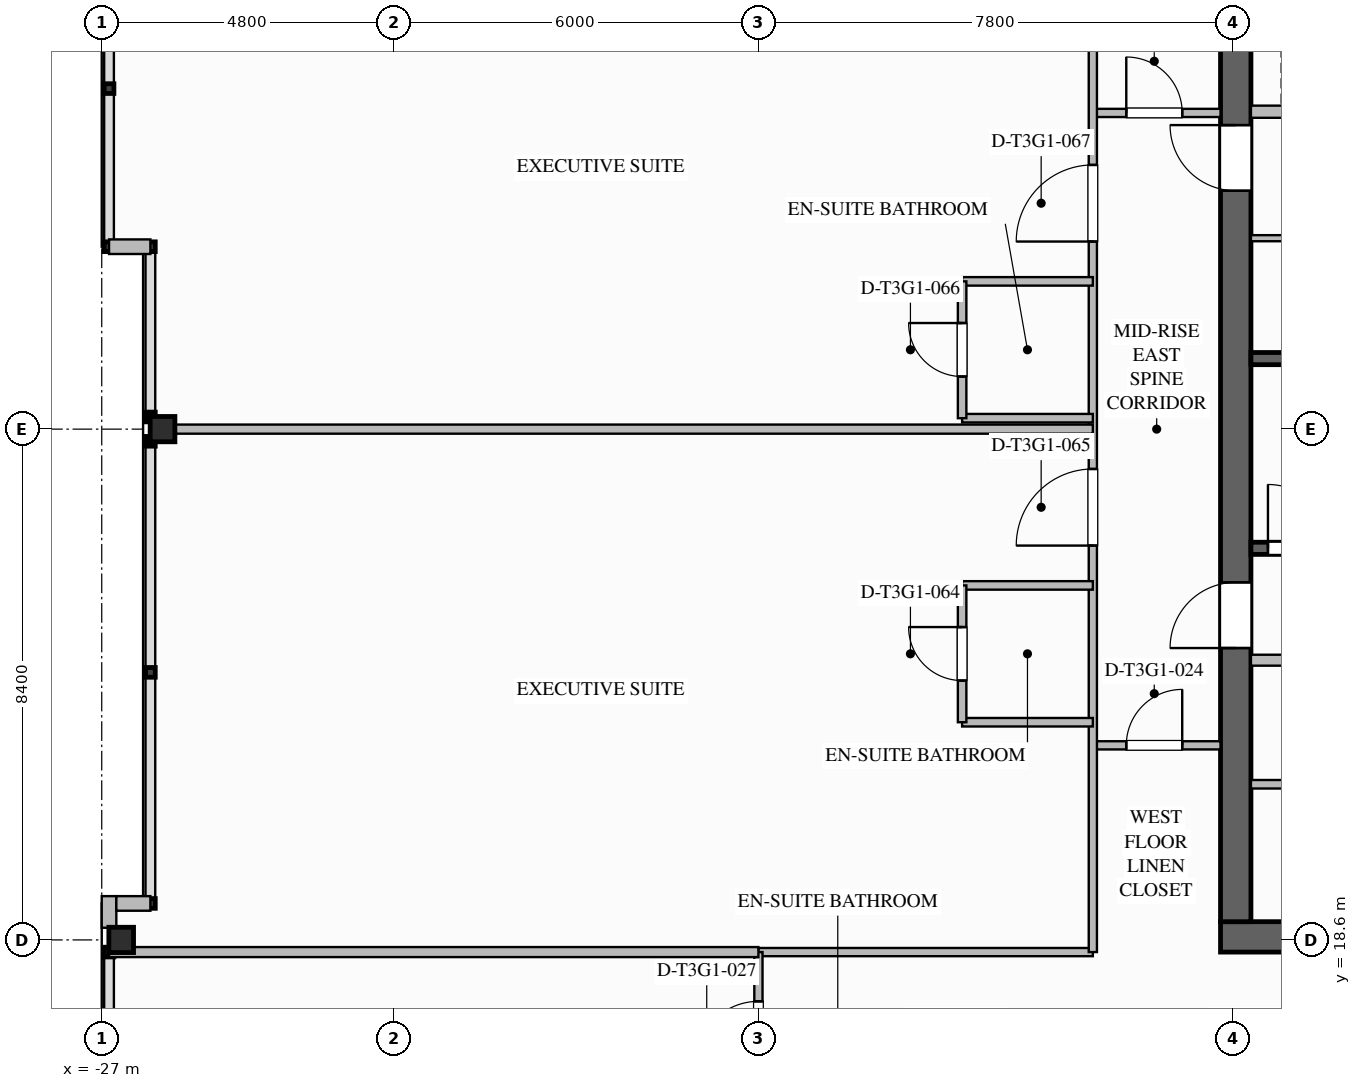
"""IFC4 building model, lengths in metres.
Left out: names, types, materials, properties, quantities, classifications, styles, units other than length and angle.
Written with IfcOpenShell. Run it as: python <this file> out.ifc"""

import sys

from ifc_helpers import new_model, si_unit, direction, frame, frame_2d, origin, origin_2d, place, context, subcontext, project, spatial, rectangle, i_section, extrude, element, fill, save


model = new_model("IFC4")
c1 = context("Model", 3, precision=1e-05, world=origin(), true_north=direction((0.0, 1.0)))
c2 = subcontext(c1, "Body", "Model", "MODEL_VIEW")
j1 = project(units=[si_unit("LENGTHUNIT", "METRE"), si_unit("PLANEANGLEUNIT", "RADIAN")], contexts=[c1])
p1 = place(None, origin())
s1 = spatial("IfcSite", under=j1, at=p1, CompositionType="ELEMENT")
p2 = place(p1, origin())
s2 = spatial("IfcBuilding", under=s1, at=p2, CompositionType="ELEMENT")
p3 = place(p2, frame((0.0, 0.0, 150.4)))
s3 = spatial("IfcBuildingStorey", under=s2, at=p3, CompositionType="ELEMENT", Elevation=150.4)
p4 = place(p3, frame((8.6, 18.65, 0.0), z_axis=(0.0, 0.0, 1.0), x_axis=(-1.0, 0.0, 0.0)))
e1 = element("IfcWall", 1, at=p4, inside=s3, PredefinedType="SHEAR", context=c2, shape_type="SweptSolid", body=[
    extrude(rectangle(XDim=17.2, YDim=0.5, at=frame_2d((8.6, 0.0))), origin(), (0.0, 0.0, 1.0), 3.55),
])
p5 = place(p3, frame((-8.35, 18.9, 0.0), z_axis=(0.0, 0.0, 1.0), x_axis=(0.0, 1.0, 0.0)))
e2 = element("IfcWall", 2, at=p5, inside=s3, PredefinedType="SHEAR", context=c2, shape_type="SweptSolid", body=[
    extrude(rectangle(XDim=16.2, YDim=0.5, at=frame_2d((8.1, 0.0))), origin(), (0.0, 0.0, 1.0), 3.55),
])
p6 = place(p5, frame((12.02, 0.0, 0.0)))
e3 = element("IfcOpeningElement", 3, at=p6, cuts=e2, PredefinedType="OPENING", context=c2, shape_type="SweptSolid", body=[
    extrude(rectangle(XDim=1.08, YDim=2.04, at=frame_2d((0.54, 1.02))), frame((0.0, 0.26, 0.0), z_axis=(0.0, -1.0, 0.0), x_axis=(1.0, 0.0, 0.0)), (0.0, 0.0, 1.0), 0.52),
])
p7 = place(p5, frame((4.5, 0.0, 0.0)))
e4 = element("IfcOpeningElement", 4, at=p7, cuts=e2, PredefinedType="OPENING", context=c2, shape_type="SweptSolid", body=[
    extrude(rectangle(XDim=1.08, YDim=2.04, at=frame_2d((0.54, 1.02))), frame((0.0, 0.26, 0.0), z_axis=(0.0, -1.0, 0.0), x_axis=(1.0, 0.0, 0.0)), (0.0, 0.0, 1.0), 0.52),
])
for number, where, z_axis, x_axis in (
    (5, (-26.68, 18.6, 0.0), (0.0, 0.0, 1.0), (1.0, 0.0, 0.0)),
    (6, (-26.0, 27.0, 0.0), (0.0, 0.0, 1.0), (1.0, 0.0, 0.0)),
):
    element("IfcColumn", number, at=place(p3, frame(where, z_axis=z_axis, x_axis=x_axis)), inside=s3, PredefinedType="COLUMN", context=c2, shape_type="SweptSolid", body=[
        extrude(i_section(OverallWidth=0.406, OverallDepth=0.416, WebThickness=0.03, FlangeThickness=0.048, FilletRadius=0.028, at=origin_2d()), origin(), (0.0, 0.0, 1.0), 3.547),
    ])
p8 = place(p3, frame((-26.88, 18.8, 0.0), z_axis=(0.0, 0.0, 1.0), x_axis=(0.0, 1.0, 0.0)))
e7 = element("IfcWall", 7, at=p8, inside=s3, PredefinedType="STANDARD", context=c2, shape_type="SweptSolid", body=[
    extrude(rectangle(XDim=0.52, YDim=0.24, at=frame_2d((0.26, 0.0))), origin(), (0.0, 0.0, 1.0), 3.29),
])
p9 = place(p3, frame((-26.76, 19.2, 0.0), z_axis=(0.0, 0.0, 1.0), x_axis=(1.0, 0.0, 0.0)))
e8 = element("IfcWall", 8, at=p9, inside=s3, PredefinedType="STANDARD", context=c2, shape_type="SweptSolid", body=[
    extrude(rectangle(XDim=0.56, YDim=0.24, at=frame_2d((0.28, 0.0))), origin(), (0.0, 0.0, 1.0), 3.29),
])
p10 = place(p3, frame((-26.2, 30.0, 0.0), z_axis=(0.0, 0.0, 1.0), x_axis=(-1.0, 0.0, 0.0)))
e9 = element("IfcWall", 9, at=p10, inside=s3, PredefinedType="STANDARD", context=c2, shape_type="SweptSolid", body=[
    extrude(rectangle(XDim=0.68, YDim=0.24, at=frame_2d((0.34, 0.0))), origin(), (0.0, 0.0, 1.0), 3.29),
])
p11 = place(p3, frame((-8.1, 25.04, 0.0), z_axis=(0.0, 0.0, 1.0), x_axis=(1.0, 0.0, 0.0)))
e10 = element("IfcWall", 10, at=p11, inside=s3, PredefinedType="SOLIDWALL", context=c2, shape_type="SweptSolid", body=[
    extrude(rectangle(XDim=8.1, YDim=0.2, at=frame_2d((4.05, 0.0))), origin(), (0.0, 0.0, 1.0), 3.29),
])
p12 = place(p11, frame((0.28, 0.0, 0.0)))
e11 = element("IfcOpeningElement", 11, at=p12, cuts=e10, PredefinedType="OPENING", context=c2, shape_type="SweptSolid", body=[
    extrude(rectangle(XDim=1.05, YDim=2.1, at=frame_2d((0.525, 1.05))), frame((0.0, 0.11, 0.0), z_axis=(0.0, -1.0, 0.0), x_axis=(1.0, 0.0, 0.0)), (0.0, 0.0, 1.0), 0.22),
])
p13 = place(p3, frame((-8.1, 28.16, 0.0), z_axis=(0.0, 0.0, 1.0), x_axis=(1.0, 0.0, 0.0)))
e12 = element("IfcWall", 12, at=p13, inside=s3, PredefinedType="SOLIDWALL", context=c2, shape_type="SweptSolid", body=[
    extrude(rectangle(XDim=8.1, YDim=0.2, at=frame_2d((4.05, 0.0))), origin(), (0.0, 0.0, 1.0), 3.29),
])
p14 = place(p3, frame((-8.1, 32.22, 0.0), z_axis=(0.0, 0.0, 1.0), x_axis=(1.0, 0.0, 0.0)))
e13 = element("IfcWall", 13, at=p14, inside=s3, PredefinedType="SOLIDWALL", context=c2, shape_type="SweptSolid", body=[
    extrude(rectangle(XDim=7.1, YDim=0.2, at=frame_2d((3.55, 0.0))), origin(), (0.0, 0.0, 1.0), 3.29),
])
p15 = place(p14, frame((0.95, 0.0, 0.0)))
e14 = element("IfcOpeningElement", 14, at=p15, cuts=e13, PredefinedType="OPENING", context=c2, shape_type="SweptSolid", body=[
    extrude(rectangle(XDim=1.1, YDim=2.2, at=frame_2d((0.55, 1.1))), frame((0.0, 0.11, 0.0), z_axis=(0.0, -1.0, 0.0), x_axis=(1.0, 0.0, 0.0)), (0.0, 0.0, 1.0), 0.22),
])
p16 = place(p14, frame((3.27, 0.0, 0.0)))
e15 = element("IfcOpeningElement", 15, at=p16, cuts=e13, PredefinedType="OPENING", context=c2, shape_type="SweptSolid", body=[
    extrude(rectangle(XDim=1.1, YDim=2.2, at=frame_2d((0.55, 1.1))), frame((0.0, 0.11, 0.0), z_axis=(0.0, -1.0, 0.0), x_axis=(1.0, 0.0, 0.0)), (0.0, 0.0, 1.0), 0.22),
])
p17 = place(p14, frame((5.59, 0.0, 0.0)))
e16 = element("IfcOpeningElement", 16, at=p17, cuts=e13, PredefinedType="OPENING", context=c2, shape_type="SweptSolid", body=[
    extrude(rectangle(XDim=1.1, YDim=2.2, at=frame_2d((0.55, 1.1))), frame((0.0, 0.11, 0.0), z_axis=(0.0, -1.0, 0.0), x_axis=(1.0, 0.0, 0.0)), (0.0, 0.0, 1.0), 0.22),
])
p18 = place(p3, frame((-8.1, 30.14, 0.0), z_axis=(0.0, 0.0, 1.0), x_axis=(1.0, 0.0, 0.0)))
e17 = element("IfcWall", 17, at=p18, inside=s3, PredefinedType="PARTITIONING", context=c2, shape_type="SweptSolid", body=[
    extrude(rectangle(XDim=7.1, YDim=0.1, at=frame_2d((3.55, 0.0))), origin(), (0.0, 0.0, 1.0), 3.29),
])
p19 = place(p18, frame((1.1, 0.0, 0.0)))
e18 = element("IfcOpeningElement", 18, at=p19, cuts=e17, PredefinedType="OPENING", context=c2, shape_type="SweptSolid", body=[
    extrude(rectangle(XDim=0.92, YDim=2.1, at=frame_2d((0.46, 1.05))), frame((0.0, 0.06, 0.0), z_axis=(0.0, -1.0, 0.0), x_axis=(1.0, 0.0, 0.0)), (0.0, 0.0, 1.0), 0.12),
])
p20 = place(p18, frame((4.6, 0.0, 0.0)))
e19 = element("IfcOpeningElement", 19, at=p20, cuts=e17, PredefinedType="OPENING", context=c2, shape_type="SweptSolid", body=[
    extrude(rectangle(XDim=0.92, YDim=2.1, at=frame_2d((0.46, 1.05))), frame((0.0, 0.06, 0.0), z_axis=(0.0, -1.0, 0.0), x_axis=(1.0, 0.0, 0.0)), (0.0, 0.0, 1.0), 0.12),
])
p21 = place(p3, frame((-8.1, 23.2, 0.0), z_axis=(0.0, 0.0, 1.0), x_axis=(1.0, 0.0, 0.0)))
e20 = element("IfcWall", 20, at=p21, inside=s3, PredefinedType="SOLIDWALL", context=c2, shape_type="SweptSolid", body=[
    extrude(rectangle(XDim=8.65, YDim=0.18, at=frame_2d((4.325, 0.0))), origin(), (0.0, 0.0, 1.0), 3.29),
])
p22 = place(p21, frame((1.4, 0.0, 0.0)))
e21 = element("IfcOpeningElement", 21, at=p22, cuts=e20, PredefinedType="OPENING", context=c2, shape_type="SweptSolid", body=[
    extrude(rectangle(XDim=1.0, YDim=2.1, at=frame_2d((0.5, 1.05))), frame((0.0, 0.1, 0.0), z_axis=(0.0, -1.0, 0.0), x_axis=(1.0, 0.0, 0.0)), (0.0, 0.0, 1.0), 0.2),
])
p23 = place(p21, frame((5.6, 0.0, 0.0)))
e22 = element("IfcOpeningElement", 22, at=p23, cuts=e20, PredefinedType="OPENING", context=c2, shape_type="SweptSolid", body=[
    extrude(rectangle(XDim=0.92, YDim=2.1, at=frame_2d((0.46, 1.05))), frame((0.0, 0.1, 0.0), z_axis=(0.0, -1.0, 0.0), x_axis=(1.0, 0.0, 0.0)), (0.0, 0.0, 1.0), 0.2),
])
p24 = place(p3, frame((-8.1, 21.16, 0.0), z_axis=(0.0, 0.0, 1.0), x_axis=(1.0, 0.0, 0.0)))
e23 = element("IfcWall", 23, at=p24, inside=s3, PredefinedType="PLUMBINGWALL", context=c2, shape_type="SweptSolid", body=[
    extrude(rectangle(XDim=8.65, YDim=0.14, at=frame_2d((4.325, 0.0))), origin(), (0.0, 0.0, 1.0), 3.29),
])
p25 = place(p24, frame((1.4, 0.0, 0.0)))
e24 = element("IfcOpeningElement", 24, at=p25, cuts=e23, PredefinedType="OPENING", context=c2, shape_type="SweptSolid", body=[
    extrude(rectangle(XDim=0.92, YDim=2.1, at=frame_2d((0.46, 1.05))), frame((0.0, 0.08, 0.0), z_axis=(0.0, -1.0, 0.0), x_axis=(1.0, 0.0, 0.0)), (0.0, 0.0, 1.0), 0.16),
])
p26 = place(p3, frame((-10.7, 21.8, 0.0), z_axis=(0.0, 0.0, 1.0), x_axis=(1.0, 0.0, 0.0)))
e25 = element("IfcWall", 25, at=p26, inside=s3, PredefinedType="PARTITIONING", context=c2, shape_type="SweptSolid", body=[
    extrude(rectangle(XDim=2.1, YDim=0.135, at=frame_2d((1.05, 0.0))), origin(), (0.0, 0.0, 1.0), 3.29),
])
p27 = place(p26, frame((0.55, 0.0, 0.0)))
e26 = element("IfcOpeningElement", 26, at=p27, cuts=e25, PredefinedType="OPENING", context=c2, shape_type="SweptSolid", body=[
    extrude(rectangle(XDim=0.92, YDim=2.1, at=frame_2d((0.46, 1.05))), frame((0.0, 0.077, 0.0), z_axis=(0.0, -1.0, 0.0), x_axis=(1.0, 0.0, 0.0)), (0.0, 0.0, 1.0), 0.155),
])
p28 = place(p3, frame((-10.7, 32.2, 0.0), z_axis=(0.0, 0.0, 1.0), x_axis=(1.0, 0.0, 0.0)))
e27 = element("IfcWall", 27, at=p28, inside=s3, PredefinedType="PARTITIONING", context=c2, shape_type="SweptSolid", body=[
    extrude(rectangle(XDim=2.1, YDim=0.135, at=frame_2d((1.05, 0.0))), origin(), (0.0, 0.0, 1.0), 3.29),
])
p29 = place(p28, frame((0.55, 0.0, 0.0)))
e28 = element("IfcOpeningElement", 28, at=p29, cuts=e27, PredefinedType="OPENING", context=c2, shape_type="SweptSolid", body=[
    extrude(rectangle(XDim=0.92, YDim=2.1, at=frame_2d((0.46, 1.05))), frame((0.0, 0.077, 0.0), z_axis=(0.0, -1.0, 0.0), x_axis=(1.0, 0.0, 0.0)), (0.0, 0.0, 1.0), 0.155),
])
p30 = place(p3, frame((-16.2, 18.4, 0.0), z_axis=(0.0, 0.0, 1.0), x_axis=(1.0, 0.0, 0.0)))
e29 = element("IfcWall", 29, at=p30, inside=s3, PredefinedType="PARTITIONING", context=c2, shape_type="SweptSolid", body=[
    extrude(rectangle(XDim=5.5, YDim=0.135, at=frame_2d((2.75, 0.0))), origin(), (0.0, 0.0, 1.0), 2.667),
])
p31 = place(p3, frame((-10.7, 18.4, 0.0), z_axis=(0.0, 0.0, 1.0), x_axis=(0.0, 1.0, 0.0)))
e30 = element("IfcWall", 30, at=p31, inside=s3, PredefinedType="PARTITIONING", context=c2, shape_type="SweptSolid", body=[
    extrude(rectangle(XDim=17.2, YDim=0.135, at=frame_2d((8.6, 0.0))), origin(), (0.0, 0.0, 1.0), 3.29),
])
p32 = place(p31, frame((6.685, 0.0, 0.0)))
e31 = element("IfcOpeningElement", 31, at=p32, cuts=e30, PredefinedType="OPENING", context=c2, shape_type="SweptSolid", body=[
    extrude(rectangle(XDim=1.26, YDim=2.2, at=frame_2d((0.63, 1.1))), frame((0.0, 0.077, 0.0), z_axis=(0.0, -1.0, 0.0), x_axis=(1.0, 0.0, 0.0)), (0.0, 0.0, 1.0), 0.155),
])
p33 = place(p31, frame((11.685, 0.0, 0.0)))
e32 = element("IfcOpeningElement", 32, at=p33, cuts=e30, PredefinedType="OPENING", context=c2, shape_type="SweptSolid", body=[
    extrude(rectangle(XDim=1.26, YDim=2.2, at=frame_2d((0.63, 1.1))), frame((0.0, 0.077, 0.0), z_axis=(0.0, -1.0, 0.0), x_axis=(1.0, 0.0, 0.0)), (0.0, 0.0, 1.0), 0.155),
])
p34 = place(p3, frame((-16.2, 16.05, 0.0), z_axis=(0.0, 0.0, 1.0), x_axis=(0.0, 1.0, 0.0)))
e33 = element("IfcWall", 33, at=p34, inside=s3, PredefinedType="PARTITIONING", context=c2, shape_type="SweptSolid", body=[
    extrude(rectangle(XDim=2.35, YDim=0.135, at=frame_2d((1.175, 0.0))), origin(), (0.0, 0.0, 1.0), 2.58),
])
p35 = place(p34, frame((0.52, 0.0, 0.0)))
e34 = element("IfcOpeningElement", 34, at=p35, cuts=e33, PredefinedType="OPENING", context=c2, shape_type="SweptSolid", body=[
    extrude(rectangle(XDim=1.02, YDim=2.15, at=frame_2d((0.51, 1.075))), frame((0.0, 0.077, 0.0), z_axis=(0.0, -1.0, 0.0), x_axis=(1.0, 0.0, 0.0)), (0.0, 0.0, 1.0), 0.155),
])
p36 = place(p3, frame((-26.88, 18.4, 0.0), z_axis=(0.0, 0.0, 1.0), x_axis=(1.0, 0.0, 0.0)))
e35 = element("IfcWall", 35, at=p36, inside=s3, PredefinedType="PARTITIONING", context=c2, shape_type="SweptSolid", body=[
    extrude(rectangle(XDim=10.68, YDim=0.165, at=frame_2d((5.34, 0.0))), origin(), (0.0, 0.0, 1.0), 2.58),
])
p37 = place(p3, frame((-26.2, 27.0, 0.0), z_axis=(0.0, 0.0, 1.0), x_axis=(1.0, 0.0, 0.0)))
e36 = element("IfcWall", 36, at=p37, inside=s3, PredefinedType="PARTITIONING", context=c2, shape_type="SweptSolid", body=[
    extrude(rectangle(XDim=15.5, YDim=0.15, at=frame_2d((7.75, 0.0))), origin(), (0.0, 0.0, 1.0), 2.58),
])
for number, where, z_axis, x_axis in (
    (37, (-10.7, 22.18, 0.0), (0.0, 0.0, 1.0), (-1.0, 0.0, 0.0)),
    (38, (-10.7, 24.43, 0.0), (0.0, 0.0, 1.0), (-1.0, 0.0, 0.0)),
):
    element("IfcWall", number, at=place(p3, frame(where, z_axis=z_axis, x_axis=x_axis)), inside=s3, PredefinedType="PLUMBINGWALL", context=c2, shape_type="SweptSolid", body=[
        extrude(rectangle(XDim=2.15, YDim=0.14, at=frame_2d((1.075, 0.0))), origin(), (0.0, 0.0, 1.0), 3.29),
    ])
p38 = place(p3, frame((-12.85, 22.18, 0.0), z_axis=(0.0, 0.0, 1.0), x_axis=(0.0, 1.0, 0.0)))
e39 = element("IfcWall", 39, at=p38, inside=s3, PredefinedType="PLUMBINGWALL", context=c2, shape_type="SweptSolid", body=[
    extrude(rectangle(XDim=2.25, YDim=0.14, at=frame_2d((1.125, 0.0))), origin(), (0.0, 0.0, 1.0), 3.29),
])
p39 = place(p38, frame((0.685, 0.0, 0.0)))
e40 = element("IfcOpeningElement", 40, at=p39, cuts=e39, PredefinedType="OPENING", context=c2, shape_type="SweptSolid", body=[
    extrude(rectangle(XDim=0.88, YDim=2.1, at=frame_2d((0.44, 1.05))), frame((0.0, 0.08, 0.0), z_axis=(0.0, -1.0, 0.0), x_axis=(1.0, 0.0, 0.0)), (0.0, 0.0, 1.0), 0.16),
])
p40 = place(p3, frame((-10.7, 27.18, 0.0), z_axis=(0.0, 0.0, 1.0), x_axis=(-1.0, 0.0, 0.0)))
e41 = element("IfcWall", 41, at=p40, inside=s3, PredefinedType="PLUMBINGWALL", context=c2, shape_type="SweptSolid", body=[
    extrude(rectangle(XDim=2.15, YDim=0.14, at=frame_2d((1.075, 0.0))), origin(), (0.0, 0.0, 1.0), 2.667),
])
p41 = place(p3, frame((-10.7, 29.43, 0.0), z_axis=(0.0, 0.0, 1.0), x_axis=(-1.0, 0.0, 0.0)))
e42 = element("IfcWall", 42, at=p41, inside=s3, PredefinedType="PLUMBINGWALL", context=c2, shape_type="SweptSolid", body=[
    extrude(rectangle(XDim=2.15, YDim=0.14, at=frame_2d((1.075, 0.0))), origin(), (0.0, 0.0, 1.0), 3.29),
])
p42 = place(p3, frame((-12.85, 27.18, 0.0), z_axis=(0.0, 0.0, 1.0), x_axis=(0.0, 1.0, 0.0)))
e43 = element("IfcWall", 43, at=p42, inside=s3, PredefinedType="PLUMBINGWALL", context=c2, shape_type="SweptSolid", body=[
    extrude(rectangle(XDim=2.25, YDim=0.14, at=frame_2d((1.125, 0.0))), origin(), (0.0, 0.0, 1.0), 3.29),
])
p43 = place(p42, frame((0.685, 0.0, 0.0)))
e44 = element("IfcOpeningElement", 44, at=p43, cuts=e43, PredefinedType="OPENING", context=c2, shape_type="SweptSolid", body=[
    extrude(rectangle(XDim=0.88, YDim=2.1, at=frame_2d((0.44, 1.05))), frame((0.0, 0.08, 0.0), z_axis=(0.0, -1.0, 0.0), x_axis=(1.0, 0.0, 0.0)), (0.0, 0.0, 1.0), 0.16),
])
p44 = place(p12, origin())
e45 = element("IfcDoor", 45, at=p44, inside=s3, OperationType="SINGLE_SWING_LEFT", PredefinedType="DOOR", context=c2, shape_type="SweptSolid", body=[
    extrude(rectangle(XDim=1.05, YDim=2.1, at=frame_2d((0.525, 1.05))), frame((0.0, 0.025, 0.0), z_axis=(0.0, -1.0, 0.0), x_axis=(1.0, 0.0, 0.0)), (0.0, 0.0, 1.0), 0.05),
])
fill(e11, e45)
p45 = place(p6, origin())
e46 = element("IfcDoor", 46, at=p45, inside=s3, OperationType="SINGLE_SWING_RIGHT", PredefinedType="DOOR", context=c2, shape_type="SweptSolid", body=[
    extrude(rectangle(XDim=1.08, YDim=2.04, at=frame_2d((0.54, 1.02))), frame((0.0, 0.025, 0.0), z_axis=(0.0, -1.0, 0.0), x_axis=(1.0, 0.0, 0.0)), (0.0, 0.0, 1.0), 0.05),
])
fill(e3, e46)
p46 = place(p7, origin())
e47 = element("IfcDoor", 47, at=p46, inside=s3, OperationType="SINGLE_SWING_LEFT", PredefinedType="DOOR", context=c2, shape_type="SweptSolid", body=[
    extrude(rectangle(XDim=1.08, YDim=2.04, at=frame_2d((0.54, 1.02))), frame((0.0, 0.025, 0.0), z_axis=(0.0, -1.0, 0.0), x_axis=(1.0, 0.0, 0.0)), (0.0, 0.0, 1.0), 0.05),
])
fill(e4, e47)
p47 = place(p27, origin())
e48 = element("IfcDoor", 48, at=p47, inside=s3, OperationType="SINGLE_SWING_RIGHT", PredefinedType="DOOR", context=c2, shape_type="SweptSolid", body=[
    extrude(rectangle(XDim=0.92, YDim=2.1, at=frame_2d((0.46, 1.05))), frame((0.0, 0.025, 0.0), z_axis=(0.0, -1.0, 0.0), x_axis=(1.0, 0.0, 0.0)), (0.0, 0.0, 1.0), 0.05),
])
fill(e26, e48)
p48 = place(p29, origin())
e49 = element("IfcDoor", 49, at=p48, inside=s3, OperationType="SINGLE_SWING_LEFT", PredefinedType="DOOR", context=c2, shape_type="SweptSolid", body=[
    extrude(rectangle(XDim=0.92, YDim=2.1, at=frame_2d((0.46, 1.05))), frame((0.0, 0.025, 0.0), z_axis=(0.0, -1.0, 0.0), x_axis=(1.0, 0.0, 0.0)), (0.0, 0.0, 1.0), 0.05),
])
fill(e28, e49)
p49 = place(p35, origin())
e50 = element("IfcDoor", 50, at=p49, inside=s3, OperationType="SINGLE_SWING_LEFT", PredefinedType="DOOR", context=c2, shape_type="SweptSolid", body=[
    extrude(rectangle(XDim=1.02, YDim=2.15, at=frame_2d((0.51, 1.075))), frame((0.0, 0.025, 0.0), z_axis=(0.0, -1.0, 0.0), x_axis=(1.0, 0.0, 0.0)), (0.0, 0.0, 1.0), 0.05),
])
fill(e34, e50)
p50 = place(p39, origin())
e51 = element("IfcDoor", 51, at=p50, inside=s3, OperationType="SINGLE_SWING_RIGHT", PredefinedType="DOOR", context=c2, shape_type="SweptSolid", body=[
    extrude(rectangle(XDim=0.88, YDim=2.1, at=frame_2d((0.44, 1.05))), frame((0.0, 0.025, 0.0), z_axis=(0.0, -1.0, 0.0), x_axis=(1.0, 0.0, 0.0)), (0.0, 0.0, 1.0), 0.05),
])
fill(e40, e51)
p51 = place(p32, origin())
e52 = element("IfcDoor", 52, at=p51, inside=s3, OperationType="SINGLE_SWING_LEFT", PredefinedType="DOOR", context=c2, shape_type="SweptSolid", body=[
    extrude(rectangle(XDim=1.26, YDim=2.2, at=frame_2d((0.63, 1.1))), frame((0.0, 0.025, 0.0), z_axis=(0.0, -1.0, 0.0), x_axis=(1.0, 0.0, 0.0)), (0.0, 0.0, 1.0), 0.05),
])
fill(e31, e52)
p52 = place(p43, origin())
e53 = element("IfcDoor", 53, at=p52, inside=s3, OperationType="SINGLE_SWING_RIGHT", PredefinedType="DOOR", context=c2, shape_type="SweptSolid", body=[
    extrude(rectangle(XDim=0.88, YDim=2.1, at=frame_2d((0.44, 1.05))), frame((0.0, 0.025, 0.0), z_axis=(0.0, -1.0, 0.0), x_axis=(1.0, 0.0, 0.0)), (0.0, 0.0, 1.0), 0.05),
])
fill(e44, e53)
p53 = place(p33, origin())
e54 = element("IfcDoor", 54, at=p53, inside=s3, OperationType="SINGLE_SWING_LEFT", PredefinedType="DOOR", context=c2, shape_type="SweptSolid", body=[
    extrude(rectangle(XDim=1.26, YDim=2.2, at=frame_2d((0.63, 1.1))), frame((0.0, 0.025, 0.0), z_axis=(0.0, -1.0, 0.0), x_axis=(1.0, 0.0, 0.0)), (0.0, 0.0, 1.0), 0.05),
])
fill(e32, e54)
save(model, sys.argv[1])
